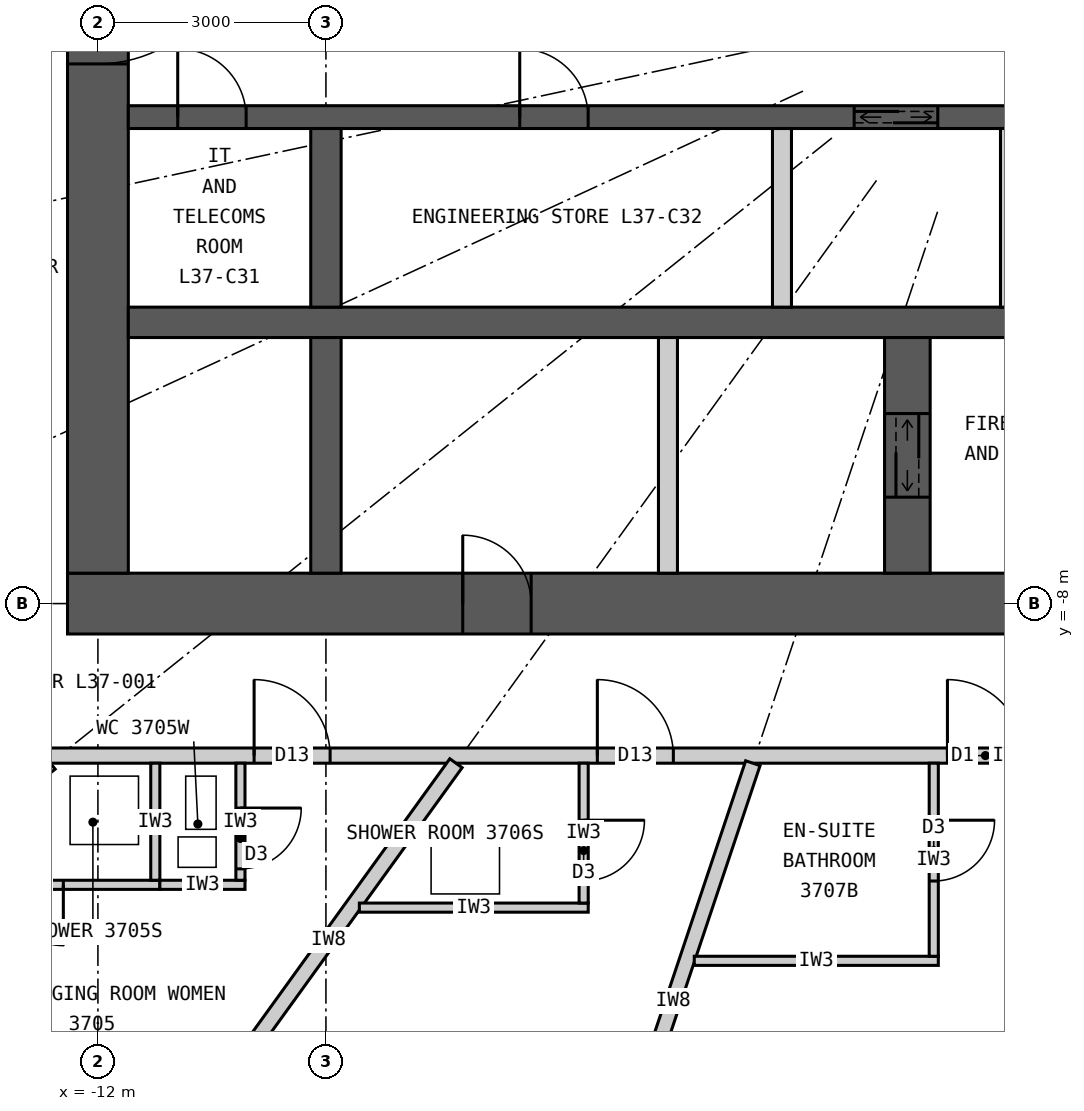
"""IFC4 building model, lengths in metres.
Left out: names, types, materials, properties, quantities, classifications, styles, units other than length and angle.
Written with IfcOpenShell. Run it as: python <this file> out.ifc"""

import sys

from ifc_helpers import new_model, si_unit, direction, frame, frame_2d, origin, place, context, subcontext, project, spatial, rectangle, extrude, element, fill, save


model = new_model("IFC4")
c1 = context("Model", 3, precision=1e-05, world=origin(), true_north=direction((0.0, 1.0)))
c2 = subcontext(c1, "Body", "Model", "MODEL_VIEW")
j1 = project(units=[si_unit("LENGTHUNIT", "METRE"), si_unit("PLANEANGLEUNIT", "RADIAN")], contexts=[c1])
p1 = place(None, origin())
s1 = spatial("IfcSite", under=j1, at=p1, CompositionType="ELEMENT")
p2 = place(p1, origin())
s2 = spatial("IfcBuilding", under=s1, at=p2, CompositionType="ELEMENT")
p3 = place(p2, frame((0.0, 0.0, 143.4)))
s3 = spatial("IfcBuildingStorey", under=s2, at=p3, CompositionType="ELEMENT", Elevation=143.4)
p4 = place(p3, frame((12.4, -8.0, 0.0), z_axis=(0.0, 0.0, 1.0), x_axis=(-1.0, 0.0, 0.0)))
e1 = element("IfcWall", 1, at=p4, inside=s3, PredefinedType="SHEAR", context=c2, shape_type="SweptSolid", body=[
    extrude(rectangle(XDim=24.8, YDim=0.8, at=frame_2d((12.4, 0.0))), origin(), (0.0, 0.0, 1.0), 3.3),
])
p5 = place(p4, frame((11.1, 0.0, 0.0)))
e2 = element("IfcOpeningElement", 2, at=p5, cuts=e1, PredefinedType="OPENING", context=c2, shape_type="SweptSolid", body=[
    extrude(rectangle(XDim=1.2, YDim=2.2, at=frame_2d((0.6, 1.1))), frame((0.0, 0.41, 0.0), z_axis=(0.0, -1.0, 0.0), x_axis=(1.0, 0.0, 0.0)), (0.0, 0.0, 1.0), 0.82),
])
p6 = place(p4, frame((18.7, 0.0, 0.0)))
e3 = element("IfcOpeningElement", 3, at=p6, cuts=e1, PredefinedType="OPENING", context=c2, shape_type="SweptSolid", body=[
    extrude(rectangle(XDim=0.9, YDim=2.2, at=frame_2d((0.45, 1.1))), frame((0.0, 0.41, 0.0), z_axis=(0.0, -1.0, 0.0), x_axis=(1.0, 0.0, 0.0)), (0.0, 0.0, 1.0), 0.82),
])
p7 = place(p3, frame((-12.0, 7.6, 0.0), z_axis=(0.0, 0.0, 1.0), x_axis=(0.0, -1.0, 0.0)))
e4 = element("IfcWall", 4, at=p7, inside=s3, PredefinedType="SHEAR", context=c2, shape_type="SweptSolid", body=[
    extrude(rectangle(XDim=15.2, YDim=0.8, at=frame_2d((7.6, 0.0))), origin(), (0.0, 0.0, 1.0), 3.3),
])
p8 = place(p7, frame((6.7, 0.0, 0.0)))
e5 = element("IfcOpeningElement", 5, at=p8, cuts=e4, PredefinedType="OPENING", context=c2, shape_type="SweptSolid", body=[
    extrude(rectangle(XDim=1.8, YDim=2.2, at=frame_2d((0.9, 1.1))), frame((0.0, 0.41, 0.0), z_axis=(0.0, -1.0, 0.0), x_axis=(1.0, 0.0, 0.0)), (0.0, 0.0, 1.0), 0.82),
])
p9 = place(p3, frame((-11.6, -4.3, 0.0), z_axis=(0.0, 0.0, 1.0), x_axis=(1.0, 0.0, 0.0)))
e6 = element("IfcWall", 6, at=p9, inside=s3, PredefinedType="SHEAR", context=c2, shape_type="SweptSolid", body=[
    extrude(rectangle(XDim=23.2, YDim=0.4, at=frame_2d((11.6, 0.0))), origin(), (0.0, 0.0, 1.0), 3.3),
])
p10 = place(p3, frame((-11.6, -1.6, 0.0), z_axis=(0.0, 0.0, 1.0), x_axis=(1.0, 0.0, 0.0)))
e7 = element("IfcWall", 7, at=p10, inside=s3, PredefinedType="SHEAR", context=c2, shape_type="SweptSolid", body=[
    extrude(rectangle(XDim=23.2, YDim=0.3, at=frame_2d((11.6, 0.0))), origin(), (0.0, 0.0, 1.0), 3.3),
])
p11 = place(p10, frame((9.55, 0.0, 0.0)))
e8 = element("IfcOpeningElement", 8, at=p11, cuts=e7, PredefinedType="OPENING", context=c2, shape_type="SweptSolid", body=[
    extrude(rectangle(XDim=1.1, YDim=2.2, at=frame_2d((0.55, 1.1))), frame((0.0, 0.16, 0.0), z_axis=(0.0, -1.0, 0.0), x_axis=(1.0, 0.0, 0.0)), (0.0, 0.0, 1.0), 0.32),
])
p12 = place(p10, frame((15.3, 0.0, 0.0)))
e9 = element("IfcOpeningElement", 9, at=p12, cuts=e7, PredefinedType="OPENING", context=c2, shape_type="SweptSolid", body=[
    extrude(rectangle(XDim=1.6, YDim=2.4, at=frame_2d((0.8, 1.2))), frame((0.0, 0.16, 0.0), z_axis=(0.0, -1.0, 0.0), x_axis=(1.0, 0.0, 0.0)), (0.0, 0.0, 1.0), 0.32),
])
p13 = place(p10, frame((0.65, 0.0, 0.0)))
e10 = element("IfcOpeningElement", 10, at=p13, cuts=e7, PredefinedType="OPENING", context=c2, shape_type="SweptSolid", body=[
    extrude(rectangle(XDim=0.9, YDim=2.2, at=frame_2d((0.45, 1.1))), frame((0.0, 0.16, 0.0), z_axis=(0.0, -1.0, 0.0), x_axis=(1.0, 0.0, 0.0)), (0.0, 0.0, 1.0), 0.32),
])
p14 = place(p10, frame((5.15, 0.0, 0.0)))
e11 = element("IfcOpeningElement", 11, at=p14, cuts=e7, PredefinedType="OPENING", context=c2, shape_type="SweptSolid", body=[
    extrude(rectangle(XDim=0.9, YDim=2.2, at=frame_2d((0.45, 1.1))), frame((0.0, 0.16, 0.0), z_axis=(0.0, -1.0, 0.0), x_axis=(1.0, 0.0, 0.0)), (0.0, 0.0, 1.0), 0.32),
])
p15 = place(p10, frame((21.65, 0.0, 0.0)))
e12 = element("IfcOpeningElement", 12, at=p15, cuts=e7, PredefinedType="OPENING", context=c2, shape_type="SweptSolid", body=[
    extrude(rectangle(XDim=0.9, YDim=2.2, at=frame_2d((0.45, 1.1))), frame((0.0, 0.16, 0.0), z_axis=(0.0, -1.0, 0.0), x_axis=(1.0, 0.0, 0.0)), (0.0, 0.0, 1.0), 0.32),
])
p16 = place(p3, frame((-9.0, -4.1, 0.0), z_axis=(0.0, 0.0, 1.0), x_axis=(0.0, 1.0, 0.0)))
e13 = element("IfcWall", 13, at=p16, inside=s3, PredefinedType="SHEAR", context=c2, shape_type="SweptSolid", body=[
    extrude(rectangle(XDim=2.35, YDim=0.4, at=frame_2d((1.175, 0.0))), origin(), (0.0, 0.0, 1.0), 3.3),
])
p17 = place(p3, frame((-9.0, -7.6, 0.0), z_axis=(0.0, 0.0, 1.0), x_axis=(0.0, 1.0, 0.0)))
e14 = element("IfcWall", 14, at=p17, inside=s3, PredefinedType="SHEAR", context=c2, shape_type="SweptSolid", body=[
    extrude(rectangle(XDim=3.1, YDim=0.4, at=frame_2d((1.55, 0.0))), origin(), (0.0, 0.0, 1.0), 3.3),
])
p18 = place(p3, frame((-1.35, -7.6, 0.0), z_axis=(0.0, 0.0, 1.0), x_axis=(0.0, 1.0, 0.0)))
e15 = element("IfcWall", 15, at=p18, inside=s3, PredefinedType="SHEAR", context=c2, shape_type="SweptSolid", body=[
    extrude(rectangle(XDim=3.1, YDim=0.6, at=frame_2d((1.55, 0.0))), origin(), (0.0, 0.0, 1.0), 3.3),
])
p19 = place(p18, frame((1.0, 0.0, 0.0)))
e16 = element("IfcOpeningElement", 16, at=p19, cuts=e15, PredefinedType="OPENING", context=c2, shape_type="SweptSolid", body=[
    extrude(rectangle(XDim=1.1, YDim=2.2, at=frame_2d((0.55, 1.1))), frame((0.0, 0.31, 0.0), z_axis=(0.0, -1.0, 0.0), x_axis=(1.0, 0.0, 0.0)), (0.0, 0.0, 1.0), 0.62),
])
p20 = place(p3, frame((-4.5, -7.6, 0.0), z_axis=(0.0, 0.0, 1.0), x_axis=(0.0, 1.0, 0.0)))
e17 = element("IfcWall", 17, at=p20, inside=s3, PredefinedType="PARTITIONING", context=c2, shape_type="SweptSolid", body=[
    extrude(rectangle(XDim=3.1, YDim=0.25, at=frame_2d((1.55, 0.0))), origin(), (0.0, 0.0, 1.0), 3.3),
])
for number, where, z_axis, x_axis in (
    (18, (-3.0, -4.1, 0.0), (0.0, 0.0, 1.0), (0.0, 1.0, 0.0)),
    (19, (0.0, -4.1, 0.0), (0.0, 0.0, 1.0), (0.0, 1.0, 0.0)),
):
    element("IfcWall", number, at=place(p3, frame(where, z_axis=z_axis, x_axis=x_axis)), inside=s3, PredefinedType="PARTITIONING", context=c2, shape_type="SweptSolid", body=[
        extrude(rectangle(XDim=2.35, YDim=0.25, at=frame_2d((1.175, 0.0))), origin(), (0.0, 0.0, 1.0), 3.3),
    ])
p21 = place(p3, frame((-16.095, -12.876, 0.0), z_axis=(0.0, 0.0, 1.0), x_axis=(0.857695199231, -0.514158482587, 0.0)))
e20 = element("IfcWall", 20, at=p21, inside=s3, PredefinedType="ELEMENTEDWALL", context=c2, shape_type="SweptSolid", body=[
    extrude(rectangle(XDim=5.536, YDim=0.15, at=frame_2d((2.768, 0.0))), origin(), (0.0, 0.0, 1.0), 3.12),
])
p22 = place(p21, frame((1.068, 0.0, 0.9)))
e21 = element("IfcOpeningElement", 21, at=p22, cuts=e20, PredefinedType="OPENING", context=c2, shape_type="SweptSolid", body=[
    extrude(rectangle(XDim=1.4, YDim=1.9, at=frame_2d((0.7, 0.95))), frame((0.0, 0.085, 0.0), z_axis=(0.0, -1.0, 0.0), x_axis=(1.0, 0.0, 0.0)), (0.0, 0.0, 1.0), 0.17),
])
p23 = place(p21, frame((3.068, 0.0, 0.9)))
e22 = element("IfcOpeningElement", 22, at=p23, cuts=e20, PredefinedType="OPENING", context=c2, shape_type="SweptSolid", body=[
    extrude(rectangle(XDim=1.4, YDim=1.9, at=frame_2d((0.7, 0.95))), frame((0.0, 0.085, 0.0), z_axis=(0.0, -1.0, 0.0), x_axis=(1.0, 0.0, 0.0)), (0.0, 0.0, 1.0), 0.17),
])
p24 = place(p3, frame((14.1, -10.0, 0.0), z_axis=(0.0, 0.0, 1.0), x_axis=(-1.0, 0.0, 0.0)))
e23 = element("IfcWall", 23, at=p24, inside=s3, PredefinedType="PARTITIONING", context=c2, shape_type="SweptSolid", body=[
    extrude(rectangle(XDim=28.2, YDim=0.2, at=frame_2d((14.1, 0.0))), origin(), (0.0, 0.0, 1.0), 3.12),
])
p25 = place(p24, frame((23.045, 0.0, 0.0)))
e24 = element("IfcOpeningElement", 24, at=p25, cuts=e23, PredefinedType="OPENING", context=c2, shape_type="SweptSolid", body=[
    extrude(rectangle(XDim=1.0, YDim=2.2, at=frame_2d((0.5, 1.1))), frame((0.0, 0.11, 0.0), z_axis=(0.0, -1.0, 0.0), x_axis=(1.0, 0.0, 0.0)), (0.0, 0.0, 1.0), 0.22),
])
p26 = place(p24, frame((18.529, 0.0, 0.0)))
e25 = element("IfcOpeningElement", 25, at=p26, cuts=e23, PredefinedType="OPENING", context=c2, shape_type="SweptSolid", body=[
    extrude(rectangle(XDim=1.0, YDim=2.2, at=frame_2d((0.5, 1.1))), frame((0.0, 0.11, 0.0), z_axis=(0.0, -1.0, 0.0), x_axis=(1.0, 0.0, 0.0)), (0.0, 0.0, 1.0), 0.22),
])
p27 = place(p24, frame((13.923, 0.0, 0.0)))
e26 = element("IfcOpeningElement", 26, at=p27, cuts=e23, PredefinedType="OPENING", context=c2, shape_type="SweptSolid", body=[
    extrude(rectangle(XDim=1.0, YDim=2.2, at=frame_2d((0.5, 1.1))), frame((0.0, 0.11, 0.0), z_axis=(0.0, -1.0, 0.0), x_axis=(1.0, 0.0, 0.0)), (0.0, 0.0, 1.0), 0.22),
])
p28 = place(p24, frame((9.35, 0.0, 0.0)))
e27 = element("IfcOpeningElement", 27, at=p28, cuts=e23, PredefinedType="OPENING", context=c2, shape_type="SweptSolid", body=[
    extrude(rectangle(XDim=1.6, YDim=2.4, at=frame_2d((0.8, 1.2))), frame((0.0, 0.11, 0.0), z_axis=(0.0, -1.0, 0.0), x_axis=(1.0, 0.0, 0.0)), (0.0, 0.0, 1.0), 0.22),
])
p29 = place(p3, frame((-12.625, -10.1, 0.0), z_axis=(0.0, 0.0, 1.0), x_axis=(-0.780876185034, -0.624685827954, 0.0)))
e28 = element("IfcWall", 28, at=p29, inside=s3, PredefinedType="PARTITIONING", context=c2, shape_type="SweptSolid", body=[
    extrude(rectangle(XDim=3.229, YDim=0.2, at=frame_2d((1.615, 0.0))), origin(), (0.0, 0.0, 1.0), 2.27),
])
p30 = place(p3, frame((-7.289, -10.1, 0.0), z_axis=(0.0, 0.0, 1.0), x_axis=(-0.585222595178, -0.810872686735, 0.0)))
e29 = element("IfcWall", 29, at=p30, inside=s3, PredefinedType="PARTITIONING", context=c2, shape_type="SweptSolid", body=[
    extrude(rectangle(XDim=5.722, YDim=0.2, at=frame_2d((2.861, 0.0))), origin(), (0.0, 0.0, 1.0), 2.27),
])
p31 = place(p3, frame((-3.383, -10.1, 0.0), z_axis=(0.0, 0.0, 1.0), x_axis=(-0.317615120474, -0.948219718866, 0.0)))
e30 = element("IfcWall", 30, at=p31, inside=s3, PredefinedType="PARTITIONING", context=c2, shape_type="SweptSolid", body=[
    extrude(rectangle(XDim=6.597, YDim=0.2, at=frame_2d((3.299, 0.0))), origin(), (0.0, 0.0, 1.0), 2.27),
])
p32 = place(p3, frame((-14.525, -11.7, 0.0), z_axis=(0.0, 0.0, 1.0), x_axis=(1.0, 0.0, 0.0)))
e31 = element("IfcWall", 31, at=p32, inside=s3, PredefinedType="PARTITIONING", context=c2, shape_type="SweptSolid", body=[
    extrude(rectangle(XDim=3.34, YDim=0.12, at=frame_2d((1.67, 0.0))), origin(), (0.0, 0.0, 1.0), 3.12),
])
p33 = place(p32, frame((1.27, 0.0, 0.0)))
e32 = element("IfcOpeningElement", 32, at=p33, cuts=e31, PredefinedType="OPENING", context=c2, shape_type="SweptSolid", body=[
    extrude(rectangle(XDim=0.8, YDim=2.1, at=frame_2d((0.4, 1.05))), frame((0.0, 0.07, 0.0), z_axis=(0.0, -1.0, 0.0), x_axis=(1.0, 0.0, 0.0)), (0.0, 0.0, 1.0), 0.14),
])
p34 = place(p3, frame((-11.245, -10.1, 0.0), z_axis=(0.0, 0.0, 1.0), x_axis=(0.0, -1.0, 0.0)))
e33 = element("IfcWall", 33, at=p34, inside=s3, PredefinedType="PARTITIONING", context=c2, shape_type="SweptSolid", body=[
    extrude(rectangle(XDim=1.54, YDim=0.12, at=frame_2d((0.77, 0.0))), origin(), (0.0, 0.0, 1.0), 3.12),
])
p35 = place(p3, frame((-11.185, -11.7, 0.0), z_axis=(0.0, 0.0, 1.0), x_axis=(1.0, 0.0, 0.0)))
e34 = element("IfcWall", 34, at=p35, inside=s3, PredefinedType="PARTITIONING", context=c2, shape_type="SweptSolid", body=[
    extrude(rectangle(XDim=1.12, YDim=0.12, at=frame_2d((0.56, 0.0))), origin(), (0.0, 0.0, 1.0), 3.12),
])
p36 = place(p3, frame((-10.125, -10.1, 0.0), z_axis=(0.0, 0.0, 1.0), x_axis=(0.0, -1.0, 0.0)))
e35 = element("IfcWall", 35, at=p36, inside=s3, PredefinedType="PARTITIONING", context=c2, shape_type="SweptSolid", body=[
    extrude(rectangle(XDim=1.54, YDim=0.12, at=frame_2d((0.77, 0.0))), origin(), (0.0, 0.0, 1.0), 3.12),
])
p37 = place(p36, frame((0.59, 0.0, 0.0)))
e36 = element("IfcOpeningElement", 36, at=p37, cuts=e35, PredefinedType="OPENING", context=c2, shape_type="SweptSolid", body=[
    extrude(rectangle(XDim=0.8, YDim=2.1, at=frame_2d((0.4, 1.05))), frame((0.0, 0.07, 0.0), z_axis=(0.0, -1.0, 0.0), x_axis=(1.0, 0.0, 0.0)), (0.0, 0.0, 1.0), 0.14),
])
p38 = place(p3, frame((-8.56, -12.0, 0.0), z_axis=(0.0, 0.0, 1.0), x_axis=(1.0, 0.0, 0.0)))
e37 = element("IfcWall", 37, at=p38, inside=s3, PredefinedType="PARTITIONING", context=c2, shape_type="SweptSolid", body=[
    extrude(rectangle(XDim=3.011, YDim=0.12, at=frame_2d((1.506, 0.0))), origin(), (0.0, 0.0, 1.0), 3.12),
])
p39 = place(p3, frame((-5.609, -10.1, 0.0), z_axis=(0.0, 0.0, 1.0), x_axis=(0.0, -1.0, 0.0)))
e38 = element("IfcWall", 38, at=p39, inside=s3, PredefinedType="PARTITIONING", context=c2, shape_type="SweptSolid", body=[
    extrude(rectangle(XDim=1.84, YDim=0.12, at=frame_2d((0.92, 0.0))), origin(), (0.0, 0.0, 1.0), 3.12),
])
p40 = place(p39, frame((0.75, 0.0, 0.0)))
e39 = element("IfcOpeningElement", 39, at=p40, cuts=e38, PredefinedType="OPENING", context=c2, shape_type="SweptSolid", body=[
    extrude(rectangle(XDim=0.8, YDim=2.1, at=frame_2d((0.4, 1.05))), frame((0.0, 0.07, 0.0), z_axis=(0.0, -1.0, 0.0), x_axis=(1.0, 0.0, 0.0)), (0.0, 0.0, 1.0), 0.14),
])
p41 = place(p3, frame((-4.154, -12.7, 0.0), z_axis=(0.0, 0.0, 1.0), x_axis=(1.0, 0.0, 0.0)))
e40 = element("IfcWall", 40, at=p41, inside=s3, PredefinedType="PARTITIONING", context=c2, shape_type="SweptSolid", body=[
    extrude(rectangle(XDim=3.211, YDim=0.12, at=frame_2d((1.605, 0.0))), origin(), (0.0, 0.0, 1.0), 3.12),
])
p42 = place(p3, frame((-1.003, -10.1, 0.0), z_axis=(0.0, 0.0, 1.0), x_axis=(0.0, -1.0, 0.0)))
e41 = element("IfcWall", 41, at=p42, inside=s3, PredefinedType="PARTITIONING", context=c2, shape_type="SweptSolid", body=[
    extrude(rectangle(XDim=2.54, YDim=0.12, at=frame_2d((1.27, 0.0))), origin(), (0.0, 0.0, 1.0), 3.12),
])
p43 = place(p42, frame((0.75, 0.0, 0.0)))
e42 = element("IfcOpeningElement", 42, at=p43, cuts=e41, PredefinedType="OPENING", context=c2, shape_type="SweptSolid", body=[
    extrude(rectangle(XDim=0.8, YDim=2.1, at=frame_2d((0.4, 1.05))), frame((0.0, 0.07, 0.0), z_axis=(0.0, -1.0, 0.0), x_axis=(1.0, 0.0, 0.0)), (0.0, 0.0, 1.0), 0.14),
])
p44 = place(p33, origin())
e43 = element("IfcDoor", 43, at=p44, inside=s3, OperationType="SINGLE_SWING_RIGHT", PredefinedType="DOOR", context=c2, shape_type="SweptSolid", body=[
    extrude(rectangle(XDim=0.8, YDim=2.1, at=frame_2d((0.4, 1.05))), frame((0.0, 0.025, 0.0), z_axis=(0.0, -1.0, 0.0), x_axis=(1.0, 0.0, 0.0)), (0.0, 0.0, 1.0), 0.05),
])
fill(e32, e43)
p45 = place(p37, origin())
e44 = element("IfcDoor", 44, at=p45, inside=s3, OperationType="SINGLE_SWING_LEFT", PredefinedType="DOOR", context=c2, shape_type="SweptSolid", body=[
    extrude(rectangle(XDim=0.8, YDim=2.1, at=frame_2d((0.4, 1.05))), frame((0.0, 0.025, 0.0), z_axis=(0.0, -1.0, 0.0), x_axis=(1.0, 0.0, 0.0)), (0.0, 0.0, 1.0), 0.05),
])
fill(e36, e44)
p46 = place(p25, origin())
e45 = element("IfcDoor", 45, at=p46, inside=s3, OperationType="SINGLE_SWING_RIGHT", PredefinedType="DOOR", context=c2, shape_type="SweptSolid", body=[
    extrude(rectangle(XDim=1.0, YDim=2.2, at=frame_2d((0.5, 1.1))), frame((0.0, 0.025, 0.0), z_axis=(0.0, -1.0, 0.0), x_axis=(1.0, 0.0, 0.0)), (0.0, 0.0, 1.0), 0.05),
])
fill(e24, e45)
p47 = place(p40, origin())
e46 = element("IfcDoor", 46, at=p47, inside=s3, OperationType="SINGLE_SWING_LEFT", PredefinedType="DOOR", context=c2, shape_type="SweptSolid", body=[
    extrude(rectangle(XDim=0.8, YDim=2.1, at=frame_2d((0.4, 1.05))), frame((0.0, 0.025, 0.0), z_axis=(0.0, -1.0, 0.0), x_axis=(1.0, 0.0, 0.0)), (0.0, 0.0, 1.0), 0.05),
])
fill(e39, e46)
p48 = place(p26, origin())
e47 = element("IfcDoor", 47, at=p48, inside=s3, OperationType="SINGLE_SWING_RIGHT", PredefinedType="DOOR", context=c2, shape_type="SweptSolid", body=[
    extrude(rectangle(XDim=1.0, YDim=2.2, at=frame_2d((0.5, 1.1))), frame((0.0, 0.025, 0.0), z_axis=(0.0, -1.0, 0.0), x_axis=(1.0, 0.0, 0.0)), (0.0, 0.0, 1.0), 0.05),
])
fill(e25, e47)
p49 = place(p43, origin())
e48 = element("IfcDoor", 48, at=p49, inside=s3, OperationType="SINGLE_SWING_LEFT", PredefinedType="DOOR", context=c2, shape_type="SweptSolid", body=[
    extrude(rectangle(XDim=0.8, YDim=2.1, at=frame_2d((0.4, 1.05))), frame((0.0, 0.025, 0.0), z_axis=(0.0, -1.0, 0.0), x_axis=(1.0, 0.0, 0.0)), (0.0, 0.0, 1.0), 0.05),
])
fill(e42, e48)
p50 = place(p27, origin())
e49 = element("IfcDoor", 49, at=p50, inside=s3, OperationType="SINGLE_SWING_RIGHT", PredefinedType="DOOR", context=c2, shape_type="SweptSolid", body=[
    extrude(rectangle(XDim=1.0, YDim=2.2, at=frame_2d((0.5, 1.1))), frame((0.0, 0.025, 0.0), z_axis=(0.0, -1.0, 0.0), x_axis=(1.0, 0.0, 0.0)), (0.0, 0.0, 1.0), 0.05),
])
fill(e26, e49)
p51 = place(p19, origin())
e50 = element("IfcDoor", 50, at=p51, inside=s3, OperationType="DOUBLE_DOOR_SLIDING", PredefinedType="DOOR", context=c2, shape_type="SweptSolid", body=[
    extrude(rectangle(XDim=1.1, YDim=2.2, at=frame_2d((0.55, 1.1))), frame((0.0, 0.025, 0.0), z_axis=(0.0, -1.0, 0.0), x_axis=(1.0, 0.0, 0.0)), (0.0, 0.0, 1.0), 0.05),
])
fill(e16, e50)
p52 = place(p6, origin())
e51 = element("IfcDoor", 51, at=p52, inside=s3, OperationType="SINGLE_SWING_RIGHT", PredefinedType="DOOR", context=c2, shape_type="SweptSolid", body=[
    extrude(rectangle(XDim=0.9, YDim=2.2, at=frame_2d((0.45, 1.1))), frame((0.0, 0.025, 0.0), z_axis=(0.0, -1.0, 0.0), x_axis=(1.0, 0.0, 0.0)), (0.0, 0.0, 1.0), 0.05),
])
fill(e3, e51)
p53 = place(p11, origin())
e52 = element("IfcDoor", 52, at=p53, inside=s3, OperationType="DOUBLE_DOOR_SLIDING", PredefinedType="DOOR", context=c2, shape_type="SweptSolid", body=[
    extrude(rectangle(XDim=1.1, YDim=2.2, at=frame_2d((0.55, 1.1))), frame((0.0, 0.025, 0.0), z_axis=(0.0, -1.0, 0.0), x_axis=(1.0, 0.0, 0.0)), (0.0, 0.0, 1.0), 0.05),
])
fill(e8, e52)
p54 = place(p13, origin())
e53 = element("IfcDoor", 53, at=p54, inside=s3, OperationType="SINGLE_SWING_LEFT", PredefinedType="DOOR", context=c2, shape_type="SweptSolid", body=[
    extrude(rectangle(XDim=0.9, YDim=2.2, at=frame_2d((0.45, 1.1))), frame((0.0, 0.025, 0.0), z_axis=(0.0, -1.0, 0.0), x_axis=(1.0, 0.0, 0.0)), (0.0, 0.0, 1.0), 0.05),
])
fill(e10, e53)
p55 = place(p14, origin())
e54 = element("IfcDoor", 54, at=p55, inside=s3, OperationType="SINGLE_SWING_LEFT", PredefinedType="DOOR", context=c2, shape_type="SweptSolid", body=[
    extrude(rectangle(XDim=0.9, YDim=2.2, at=frame_2d((0.45, 1.1))), frame((0.0, 0.025, 0.0), z_axis=(0.0, -1.0, 0.0), x_axis=(1.0, 0.0, 0.0)), (0.0, 0.0, 1.0), 0.05),
])
fill(e11, e54)
p56 = place(p8, origin())
e55 = element("IfcDoor", 55, at=p56, inside=s3, OperationType="DOUBLE_DOOR_DOUBLE_SWING", PredefinedType="DOOR", context=c2, shape_type="SweptSolid", body=[
    extrude(rectangle(XDim=1.8, YDim=2.2, at=frame_2d((0.9, 1.1))), frame((0.0, 0.025, 0.0), z_axis=(0.0, -1.0, 0.0), x_axis=(1.0, 0.0, 0.0)), (0.0, 0.0, 1.0), 0.05),
])
fill(e5, e55)
save(model, sys.argv[1])
